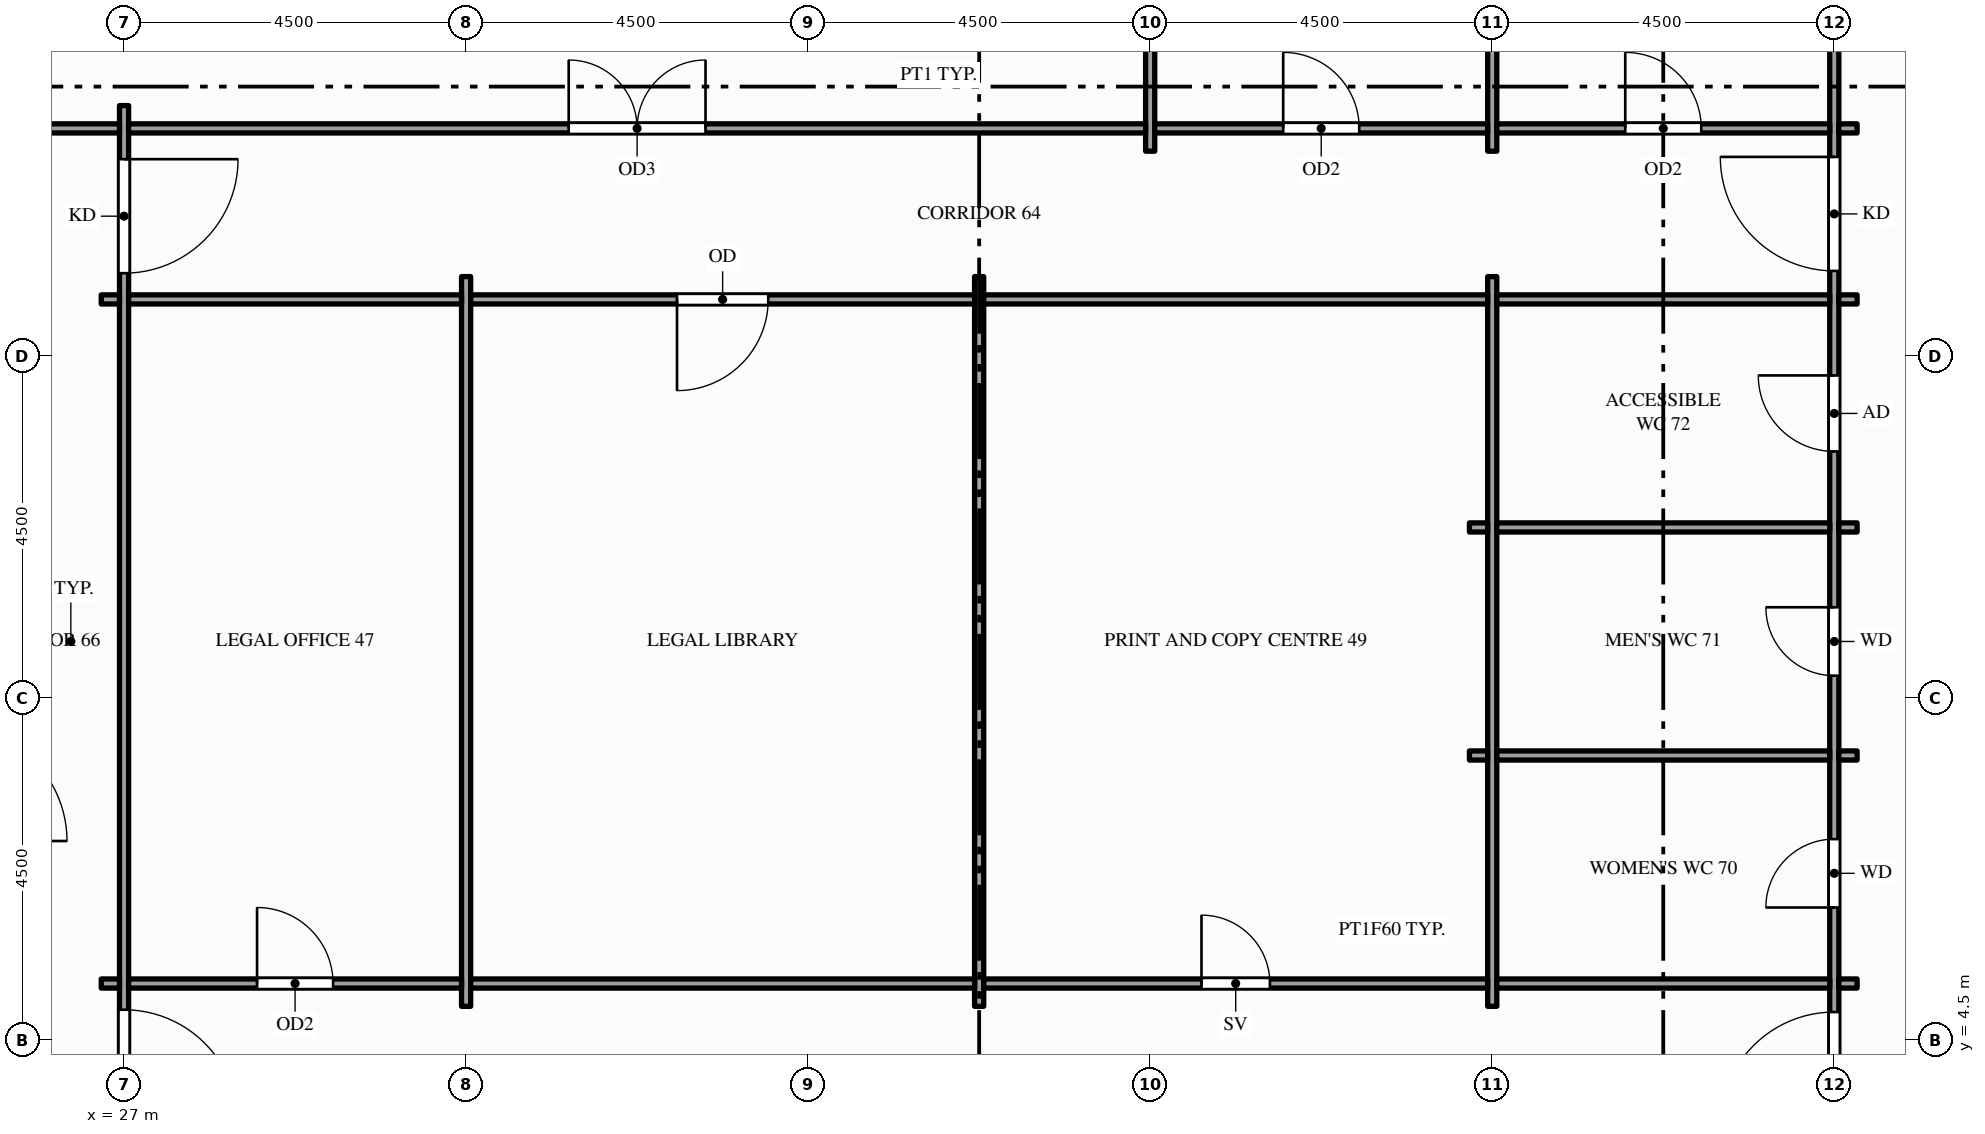
"""IFC4 building model, lengths in metres.
Left out: names, types, materials, properties, quantities, classifications, styles, units other than length and angle.
Written with IfcOpenShell. Run it as: python <this file> out.ifc"""

import sys

from ifc_helpers import new_model, si_unit, direction, frame, frame_2d, origin, place, context, subcontext, project, spatial, rectangle, extrude, element, fill, save


model = new_model("IFC4")
c1 = context("Model", 3, precision=1e-05, world=origin(), true_north=direction((0.0, 1.0)))
c2 = subcontext(c1, "Body", "Model", "MODEL_VIEW")
j1 = project(units=[si_unit("LENGTHUNIT", "METRE"), si_unit("PLANEANGLEUNIT", "RADIAN")], contexts=[c1])
p1 = place(None, origin())
s1 = spatial("IfcSite", under=j1, at=p1, CompositionType="ELEMENT")
p2 = place(p1, origin())
s2 = spatial("IfcBuilding", under=s1, at=p2, CompositionType="ELEMENT")
p3 = place(p2, frame((0.0, 0.0, 223.0)))
s3 = spatial("IfcBuildingStorey", under=s2, at=p3, CompositionType="ELEMENT", Elevation=223.0)
p4 = place(p3, frame((27.0, 2.7, 0.0), z_axis=(0.0, 0.0, 1.0), x_axis=(0.0, 1.0, 0.0)))
e1 = element("IfcWall", 1, at=p4, inside=s3, PredefinedType="PARTITIONING", context=c2, shape_type="SweptSolid", body=[
    extrude(rectangle(XDim=14.1, YDim=0.12, at=frame_2d((7.05, 0.0))), origin(), (0.0, 0.0, 1.0), 2.87),
])
p5 = place(p4, frame((0.705, 0.0, 0.0)))
e2 = element("IfcOpeningElement", 2, at=p5, cuts=e1, PredefinedType="OPENING", context=c2, shape_type="SweptSolid", body=[
    extrude(rectangle(XDim=1.5, YDim=2.1, at=frame_2d((0.75, 1.05))), frame((0.0, 0.07, 0.0), z_axis=(0.0, -1.0, 0.0), x_axis=(1.0, 0.0, 0.0)), (0.0, 0.0, 1.0), 0.14),
])
p6 = place(p4, frame((11.895, 0.0, 0.0)))
e3 = element("IfcOpeningElement", 3, at=p6, cuts=e1, PredefinedType="OPENING", context=c2, shape_type="SweptSolid", body=[
    extrude(rectangle(XDim=1.5, YDim=2.1, at=frame_2d((0.75, 1.05))), frame((0.0, 0.07, 0.0), z_axis=(0.0, -1.0, 0.0), x_axis=(1.0, 0.0, 0.0)), (0.0, 0.0, 1.0), 0.14),
])
for number, where, z_axis, x_axis in (
    (4, (31.5, 4.95, 0.0), (0.0, 0.0, 1.0), (0.0, 1.0, 0.0)),
    (5, (38.25, 4.95, 0.0), (0.0, 0.0, 1.0), (0.0, 1.0, 0.0)),
):
    element("IfcWall", number, at=place(p3, frame(where, z_axis=z_axis, x_axis=x_axis)), inside=s3, PredefinedType="PARTITIONING", context=c2, shape_type="SweptSolid", body=[
        extrude(rectangle(XDim=9.6, YDim=0.12, at=frame_2d((4.8, 0.0))), origin(), (0.0, 0.0, 1.0), 2.87),
    ])
p7 = place(p3, frame((40.5, 16.2, 0.0), z_axis=(0.0, 0.0, 1.0), x_axis=(0.0, 1.0, 0.0)))
e6 = element("IfcWall", 6, at=p7, inside=s3, PredefinedType="PARTITIONING", context=c2, shape_type="SweptSolid", body=[
    extrude(rectangle(XDim=4.65, YDim=0.12, at=frame_2d((2.325, 0.0))), origin(), (0.0, 0.0, 1.0), 2.87),
])
p8 = place(p3, frame((45.0, 4.95, 0.0), z_axis=(0.0, 0.0, 1.0), x_axis=(0.0, 1.0, 0.0)))
e7 = element("IfcWall", 7, at=p8, inside=s3, PredefinedType="PARTITIONING", context=c2, shape_type="SweptSolid", body=[
    extrude(rectangle(XDim=9.6, YDim=0.12, at=frame_2d((4.8, 0.0))), origin(), (0.0, 0.0, 1.0), 2.87),
])
p9 = place(p3, frame((45.0, 16.2, 0.0), z_axis=(0.0, 0.0, 1.0), x_axis=(0.0, 1.0, 0.0)))
e8 = element("IfcWall", 8, at=p9, inside=s3, PredefinedType="PARTITIONING", context=c2, shape_type="SweptSolid", body=[
    extrude(rectangle(XDim=4.65, YDim=0.12, at=frame_2d((2.325, 0.0))), origin(), (0.0, 0.0, 1.0), 2.87),
])
p10 = place(p3, frame((49.5, -1.35, 0.0), z_axis=(0.0, 0.0, 1.0), x_axis=(0.0, 1.0, 0.0)))
e9 = element("IfcWall", 9, at=p10, inside=s3, PredefinedType="PARTITIONING", context=c2, shape_type="SweptSolid", body=[
    extrude(rectangle(XDim=22.2, YDim=0.12, at=frame_2d((11.1, 0.0))), origin(), (0.0, 0.0, 1.0), 2.87),
])
p11 = place(p10, frame((4.725, 0.0, 0.0)))
e10 = element("IfcOpeningElement", 10, at=p11, cuts=e9, PredefinedType="OPENING", context=c2, shape_type="SweptSolid", body=[
    extrude(rectangle(XDim=1.5, YDim=2.1, at=frame_2d((0.75, 1.05))), frame((0.0, 0.07, 0.0), z_axis=(0.0, -1.0, 0.0), x_axis=(1.0, 0.0, 0.0)), (0.0, 0.0, 1.0), 0.14),
])
p12 = place(p10, frame((15.975, 0.0, 0.0)))
e11 = element("IfcOpeningElement", 11, at=p12, cuts=e9, PredefinedType="OPENING", context=c2, shape_type="SweptSolid", body=[
    extrude(rectangle(XDim=1.5, YDim=2.1, at=frame_2d((0.75, 1.05))), frame((0.0, 0.07, 0.0), z_axis=(0.0, -1.0, 0.0), x_axis=(1.0, 0.0, 0.0)), (0.0, 0.0, 1.0), 0.14),
])
p13 = place(p10, frame((7.6, 0.0, 0.0)))
e12 = element("IfcOpeningElement", 12, at=p13, cuts=e9, PredefinedType="OPENING", context=c2, shape_type="SweptSolid", body=[
    extrude(rectangle(XDim=0.9, YDim=2.1, at=frame_2d((0.45, 1.05))), frame((0.0, 0.07, 0.0), z_axis=(0.0, -1.0, 0.0), x_axis=(1.0, 0.0, 0.0)), (0.0, 0.0, 1.0), 0.14),
])
p14 = place(p10, frame((10.65, 0.0, 0.0)))
e13 = element("IfcOpeningElement", 13, at=p14, cuts=e9, PredefinedType="OPENING", context=c2, shape_type="SweptSolid", body=[
    extrude(rectangle(XDim=0.9, YDim=2.1, at=frame_2d((0.45, 1.05))), frame((0.0, 0.07, 0.0), z_axis=(0.0, -1.0, 0.0), x_axis=(1.0, 0.0, 0.0)), (0.0, 0.0, 1.0), 0.14),
])
p15 = place(p10, frame((13.6, 0.0, 0.0)))
e14 = element("IfcOpeningElement", 14, at=p15, cuts=e9, PredefinedType="OPENING", context=c2, shape_type="SweptSolid", body=[
    extrude(rectangle(XDim=1.0, YDim=2.1, at=frame_2d((0.5, 1.05))), frame((0.0, 0.07, 0.0), z_axis=(0.0, -1.0, 0.0), x_axis=(1.0, 0.0, 0.0)), (0.0, 0.0, 1.0), 0.14),
])
p16 = place(p3, frame((26.7, 5.25, 0.0), z_axis=(0.0, 0.0, 1.0), x_axis=(1.0, 0.0, 0.0)))
e15 = element("IfcWall", 15, at=p16, inside=s3, PredefinedType="PARTITIONING", context=c2, shape_type="SweptSolid", body=[
    extrude(rectangle(XDim=0.24, YDim=0.12, at=frame_2d((0.12, 0.0))), origin(), (0.0, 0.0, 1.0), 2.87),
])
p17 = place(p3, frame((27.06, 5.25, 0.0), z_axis=(0.0, 0.0, 1.0), x_axis=(1.0, 0.0, 0.0)))
e16 = element("IfcWall", 16, at=p17, inside=s3, PredefinedType="PARTITIONING", context=c2, shape_type="SweptSolid", body=[
    extrude(rectangle(XDim=4.38, YDim=0.12, at=frame_2d((2.19, 0.0))), origin(), (0.0, 0.0, 1.0), 2.87),
])
p18 = place(p17, frame((1.69, 0.0, 0.0)))
e17 = element("IfcOpeningElement", 17, at=p18, cuts=e16, PredefinedType="OPENING", context=c2, shape_type="SweptSolid", body=[
    extrude(rectangle(XDim=1.0, YDim=2.1, at=frame_2d((0.5, 1.05))), frame((0.0, 0.07, 0.0), z_axis=(0.0, -1.0, 0.0), x_axis=(1.0, 0.0, 0.0)), (0.0, 0.0, 1.0), 0.14),
])
p19 = place(p3, frame((31.56, 5.25, 0.0), z_axis=(0.0, 0.0, 1.0), x_axis=(1.0, 0.0, 0.0)))
e18 = element("IfcWall", 18, at=p19, inside=s3, PredefinedType="PARTITIONING", context=c2, shape_type="SweptSolid", body=[
    extrude(rectangle(XDim=6.63, YDim=0.12, at=frame_2d((3.315, 0.0))), origin(), (0.0, 0.0, 1.0), 2.87),
])
p20 = place(p3, frame((38.31, 5.25, 0.0), z_axis=(0.0, 0.0, 1.0), x_axis=(1.0, 0.0, 0.0)))
e19 = element("IfcWall", 19, at=p20, inside=s3, PredefinedType="PARTITIONING", context=c2, shape_type="SweptSolid", body=[
    extrude(rectangle(XDim=6.63, YDim=0.12, at=frame_2d((3.315, 0.0))), origin(), (0.0, 0.0, 1.0), 2.87),
])
p21 = place(p20, frame((2.865, 0.0, 0.0)))
e20 = element("IfcOpeningElement", 20, at=p21, cuts=e19, PredefinedType="OPENING", context=c2, shape_type="SweptSolid", body=[
    extrude(rectangle(XDim=0.9, YDim=2.1, at=frame_2d((0.45, 1.05))), frame((0.0, 0.07, 0.0), z_axis=(0.0, -1.0, 0.0), x_axis=(1.0, 0.0, 0.0)), (0.0, 0.0, 1.0), 0.14),
])
p22 = place(p3, frame((45.06, 5.25, 0.0), z_axis=(0.0, 0.0, 1.0), x_axis=(1.0, 0.0, 0.0)))
e21 = element("IfcWall", 21, at=p22, inside=s3, PredefinedType="PARTITIONING", context=c2, shape_type="SweptSolid", body=[
    extrude(rectangle(XDim=4.38, YDim=0.12, at=frame_2d((2.19, 0.0))), origin(), (0.0, 0.0, 1.0), 2.87),
])
for number, where, z_axis, x_axis in (
    (22, (49.56, 5.25, 0.0), (0.0, 0.0, 1.0), (1.0, 0.0, 0.0)),
    (23, (44.7, 8.25, 0.0), (0.0, 0.0, 1.0), (1.0, 0.0, 0.0)),
):
    element("IfcWall", number, at=place(p3, frame(where, z_axis=z_axis, x_axis=x_axis)), inside=s3, PredefinedType="PARTITIONING", context=c2, shape_type="SweptSolid", body=[
        extrude(rectangle(XDim=0.24, YDim=0.12, at=frame_2d((0.12, 0.0))), origin(), (0.0, 0.0, 1.0), 2.87),
    ])
p23 = place(p3, frame((45.06, 8.25, 0.0), z_axis=(0.0, 0.0, 1.0), x_axis=(1.0, 0.0, 0.0)))
e24 = element("IfcWall", 24, at=p23, inside=s3, PredefinedType="PARTITIONING", context=c2, shape_type="SweptSolid", body=[
    extrude(rectangle(XDim=4.38, YDim=0.12, at=frame_2d((2.19, 0.0))), origin(), (0.0, 0.0, 1.0), 2.87),
])
for number, where, z_axis, x_axis in (
    (25, (49.56, 8.25, 0.0), (0.0, 0.0, 1.0), (1.0, 0.0, 0.0)),
    (26, (44.7, 11.25, 0.0), (0.0, 0.0, 1.0), (1.0, 0.0, 0.0)),
):
    element("IfcWall", number, at=place(p3, frame(where, z_axis=z_axis, x_axis=x_axis)), inside=s3, PredefinedType="PARTITIONING", context=c2, shape_type="SweptSolid", body=[
        extrude(rectangle(XDim=0.24, YDim=0.12, at=frame_2d((0.12, 0.0))), origin(), (0.0, 0.0, 1.0), 2.87),
    ])
p24 = place(p3, frame((45.06, 11.25, 0.0), z_axis=(0.0, 0.0, 1.0), x_axis=(1.0, 0.0, 0.0)))
e27 = element("IfcWall", 27, at=p24, inside=s3, PredefinedType="PARTITIONING", context=c2, shape_type="SweptSolid", body=[
    extrude(rectangle(XDim=4.38, YDim=0.12, at=frame_2d((2.19, 0.0))), origin(), (0.0, 0.0, 1.0), 2.87),
])
for number, where, z_axis, x_axis in (
    (28, (49.56, 11.25, 0.0), (0.0, 0.0, 1.0), (1.0, 0.0, 0.0)),
    (29, (26.7, 14.25, 0.0), (0.0, 0.0, 1.0), (1.0, 0.0, 0.0)),
):
    element("IfcWall", number, at=place(p3, frame(where, z_axis=z_axis, x_axis=x_axis)), inside=s3, PredefinedType="PARTITIONING", context=c2, shape_type="SweptSolid", body=[
        extrude(rectangle(XDim=0.24, YDim=0.12, at=frame_2d((0.12, 0.0))), origin(), (0.0, 0.0, 1.0), 2.87),
    ])
p25 = place(p3, frame((27.06, 14.25, 0.0), z_axis=(0.0, 0.0, 1.0), x_axis=(1.0, 0.0, 0.0)))
e30 = element("IfcWall", 30, at=p25, inside=s3, PredefinedType="PARTITIONING", context=c2, shape_type="SweptSolid", body=[
    extrude(rectangle(XDim=4.38, YDim=0.12, at=frame_2d((2.19, 0.0))), origin(), (0.0, 0.0, 1.0), 2.87),
])
p26 = place(p3, frame((31.56, 14.25, 0.0), z_axis=(0.0, 0.0, 1.0), x_axis=(1.0, 0.0, 0.0)))
e31 = element("IfcWall", 31, at=p26, inside=s3, PredefinedType="PARTITIONING", context=c2, shape_type="SweptSolid", body=[
    extrude(rectangle(XDim=6.63, YDim=0.12, at=frame_2d((3.315, 0.0))), origin(), (0.0, 0.0, 1.0), 2.87),
])
p27 = place(p26, frame((2.715, 0.0, 0.0)))
e32 = element("IfcOpeningElement", 32, at=p27, cuts=e31, PredefinedType="OPENING", context=c2, shape_type="SweptSolid", body=[
    extrude(rectangle(XDim=1.2, YDim=2.1, at=frame_2d((0.6, 1.05))), frame((0.0, 0.07, 0.0), z_axis=(0.0, -1.0, 0.0), x_axis=(1.0, 0.0, 0.0)), (0.0, 0.0, 1.0), 0.14),
])
p28 = place(p3, frame((38.31, 14.25, 0.0), z_axis=(0.0, 0.0, 1.0), x_axis=(1.0, 0.0, 0.0)))
e33 = element("IfcWall", 33, at=p28, inside=s3, PredefinedType="PARTITIONING", context=c2, shape_type="SweptSolid", body=[
    extrude(rectangle(XDim=6.63, YDim=0.12, at=frame_2d((3.315, 0.0))), origin(), (0.0, 0.0, 1.0), 2.87),
])
p29 = place(p3, frame((45.06, 14.25, 0.0), z_axis=(0.0, 0.0, 1.0), x_axis=(1.0, 0.0, 0.0)))
e34 = element("IfcWall", 34, at=p29, inside=s3, PredefinedType="PARTITIONING", context=c2, shape_type="SweptSolid", body=[
    extrude(rectangle(XDim=4.38, YDim=0.12, at=frame_2d((2.19, 0.0))), origin(), (0.0, 0.0, 1.0), 2.87),
])
p30 = place(p3, frame((49.56, 14.25, 0.0), z_axis=(0.0, 0.0, 1.0), x_axis=(1.0, 0.0, 0.0)))
e35 = element("IfcWall", 35, at=p30, inside=s3, PredefinedType="PARTITIONING", context=c2, shape_type="SweptSolid", body=[
    extrude(rectangle(XDim=0.24, YDim=0.12, at=frame_2d((0.12, 0.0))), origin(), (0.0, 0.0, 1.0), 2.87),
])
p31 = place(p3, frame((24.81, 16.5, 0.0), z_axis=(0.0, 0.0, 1.0), x_axis=(1.0, 0.0, 0.0)))
e36 = element("IfcWall", 36, at=p31, inside=s3, PredefinedType="PARTITIONING", context=c2, shape_type="SweptSolid", body=[
    extrude(rectangle(XDim=2.13, YDim=0.12, at=frame_2d((1.065, 0.0))), origin(), (0.0, 0.0, 1.0), 2.76),
])
p32 = place(p3, frame((27.06, 16.5, 0.0), z_axis=(0.0, 0.0, 1.0), x_axis=(1.0, 0.0, 0.0)))
e37 = element("IfcWall", 37, at=p32, inside=s3, PredefinedType="PARTITIONING", context=c2, shape_type="SweptSolid", body=[
    extrude(rectangle(XDim=13.38, YDim=0.12, at=frame_2d((6.69, 0.0))), origin(), (0.0, 0.0, 1.0), 2.87),
])
p33 = place(p32, frame((5.79, 0.0, 0.0)))
e38 = element("IfcOpeningElement", 38, at=p33, cuts=e37, PredefinedType="OPENING", context=c2, shape_type="SweptSolid", body=[
    extrude(rectangle(XDim=1.8, YDim=2.1, at=frame_2d((0.9, 1.05))), frame((0.0, 0.07, 0.0), z_axis=(0.0, -1.0, 0.0), x_axis=(1.0, 0.0, 0.0)), (0.0, 0.0, 1.0), 0.14),
])
p34 = place(p3, frame((40.56, 16.5, 0.0), z_axis=(0.0, 0.0, 1.0), x_axis=(1.0, 0.0, 0.0)))
e39 = element("IfcWall", 39, at=p34, inside=s3, PredefinedType="PARTITIONING", context=c2, shape_type="SweptSolid", body=[
    extrude(rectangle(XDim=4.38, YDim=0.12, at=frame_2d((2.19, 0.0))), origin(), (0.0, 0.0, 1.0), 2.87),
])
p35 = place(p34, frame((1.69, 0.0, 0.0)))
e40 = element("IfcOpeningElement", 40, at=p35, cuts=e39, PredefinedType="OPENING", context=c2, shape_type="SweptSolid", body=[
    extrude(rectangle(XDim=1.0, YDim=2.1, at=frame_2d((0.5, 1.05))), frame((0.0, 0.07, 0.0), z_axis=(0.0, -1.0, 0.0), x_axis=(1.0, 0.0, 0.0)), (0.0, 0.0, 1.0), 0.14),
])
p36 = place(p3, frame((45.06, 16.5, 0.0), z_axis=(0.0, 0.0, 1.0), x_axis=(1.0, 0.0, 0.0)))
e41 = element("IfcWall", 41, at=p36, inside=s3, PredefinedType="PARTITIONING", context=c2, shape_type="SweptSolid", body=[
    extrude(rectangle(XDim=4.38, YDim=0.12, at=frame_2d((2.19, 0.0))), origin(), (0.0, 0.0, 1.0), 2.87),
])
p37 = place(p36, frame((1.69, 0.0, 0.0)))
e42 = element("IfcOpeningElement", 42, at=p37, cuts=e41, PredefinedType="OPENING", context=c2, shape_type="SweptSolid", body=[
    extrude(rectangle(XDim=1.0, YDim=2.1, at=frame_2d((0.5, 1.05))), frame((0.0, 0.07, 0.0), z_axis=(0.0, -1.0, 0.0), x_axis=(1.0, 0.0, 0.0)), (0.0, 0.0, 1.0), 0.14),
])
p38 = place(p3, frame((49.56, 16.5, 0.0), z_axis=(0.0, 0.0, 1.0), x_axis=(1.0, 0.0, 0.0)))
e43 = element("IfcWall", 43, at=p38, inside=s3, PredefinedType="PARTITIONING", context=c2, shape_type="SweptSolid", body=[
    extrude(rectangle(XDim=0.24, YDim=0.12, at=frame_2d((0.12, 0.0))), origin(), (0.0, 0.0, 1.0), 2.87),
])
p39 = place(p5, origin())
e44 = element("IfcDoor", 44, at=p39, inside=s3, OperationType="SINGLE_SWING_LEFT", PredefinedType="DOOR", context=c2, shape_type="SweptSolid", body=[
    extrude(rectangle(XDim=1.5, YDim=2.1, at=frame_2d((0.75, 1.05))), frame((0.0, 0.025, 0.0), z_axis=(0.0, -1.0, 0.0), x_axis=(1.0, 0.0, 0.0)), (0.0, 0.0, 1.0), 0.05),
])
fill(e2, e44)
p40 = place(p6, origin())
e45 = element("IfcDoor", 45, at=p40, inside=s3, OperationType="SINGLE_SWING_RIGHT", PredefinedType="DOOR", context=c2, shape_type="SweptSolid", body=[
    extrude(rectangle(XDim=1.5, YDim=2.1, at=frame_2d((0.75, 1.05))), frame((0.0, 0.025, 0.0), z_axis=(0.0, -1.0, 0.0), x_axis=(1.0, 0.0, 0.0)), (0.0, 0.0, 1.0), 0.05),
])
fill(e3, e45)
p41 = place(p11, origin())
e46 = element("IfcDoor", 46, at=p41, inside=s3, OperationType="SINGLE_SWING_LEFT", PredefinedType="DOOR", context=c2, shape_type="SweptSolid", body=[
    extrude(rectangle(XDim=1.5, YDim=2.1, at=frame_2d((0.75, 1.05))), frame((0.0, 0.025, 0.0), z_axis=(0.0, -1.0, 0.0), x_axis=(1.0, 0.0, 0.0)), (0.0, 0.0, 1.0), 0.05),
])
fill(e10, e46)
p42 = place(p12, origin())
e47 = element("IfcDoor", 47, at=p42, inside=s3, OperationType="SINGLE_SWING_RIGHT", PredefinedType="DOOR", context=c2, shape_type="SweptSolid", body=[
    extrude(rectangle(XDim=1.5, YDim=2.1, at=frame_2d((0.75, 1.05))), frame((0.0, 0.025, 0.0), z_axis=(0.0, -1.0, 0.0), x_axis=(1.0, 0.0, 0.0)), (0.0, 0.0, 1.0), 0.05),
])
fill(e11, e47)
p43 = place(p18, origin())
e48 = element("IfcDoor", 48, at=p43, inside=s3, OperationType="SINGLE_SWING_LEFT", PredefinedType="DOOR", context=c2, shape_type="SweptSolid", body=[
    extrude(rectangle(XDim=1.0, YDim=2.1, at=frame_2d((0.5, 1.05))), frame((0.0, 0.025, 0.0), z_axis=(0.0, -1.0, 0.0), x_axis=(1.0, 0.0, 0.0)), (0.0, 0.0, 1.0), 0.05),
])
fill(e17, e48)
p44 = place(p27, origin())
e49 = element("IfcDoor", 49, at=p44, inside=s3, OperationType="SINGLE_SWING_LEFT", PredefinedType="DOOR", context=c2, shape_type="SweptSolid", body=[
    extrude(rectangle(XDim=1.2, YDim=2.1, at=frame_2d((0.6, 1.05))), frame((0.0, 0.025, 0.0), z_axis=(0.0, -1.0, 0.0), x_axis=(1.0, 0.0, 0.0)), (0.0, 0.0, 1.0), 0.05),
])
fill(e32, e49)
p45 = place(p21, origin())
e50 = element("IfcDoor", 50, at=p45, inside=s3, OperationType="SINGLE_SWING_LEFT", PredefinedType="DOOR", context=c2, shape_type="SweptSolid", body=[
    extrude(rectangle(XDim=0.9, YDim=2.1, at=frame_2d((0.45, 1.05))), frame((0.0, 0.025, 0.0), z_axis=(0.0, -1.0, 0.0), x_axis=(1.0, 0.0, 0.0)), (0.0, 0.0, 1.0), 0.05),
])
fill(e20, e50)
p46 = place(p13, origin())
e51 = element("IfcDoor", 51, at=p46, inside=s3, OperationType="SINGLE_SWING_LEFT", PredefinedType="DOOR", context=c2, shape_type="SweptSolid", body=[
    extrude(rectangle(XDim=0.9, YDim=2.1, at=frame_2d((0.45, 1.05))), frame((0.0, 0.025, 0.0), z_axis=(0.0, -1.0, 0.0), x_axis=(1.0, 0.0, 0.0)), (0.0, 0.0, 1.0), 0.05),
])
fill(e12, e51)
p47 = place(p14, origin())
e52 = element("IfcDoor", 52, at=p47, inside=s3, OperationType="SINGLE_SWING_RIGHT", PredefinedType="DOOR", context=c2, shape_type="SweptSolid", body=[
    extrude(rectangle(XDim=0.9, YDim=2.1, at=frame_2d((0.45, 1.05))), frame((0.0, 0.025, 0.0), z_axis=(0.0, -1.0, 0.0), x_axis=(1.0, 0.0, 0.0)), (0.0, 0.0, 1.0), 0.05),
])
fill(e13, e52)
p48 = place(p15, origin())
e53 = element("IfcDoor", 53, at=p48, inside=s3, OperationType="SINGLE_SWING_RIGHT", PredefinedType="DOOR", context=c2, shape_type="SweptSolid", body=[
    extrude(rectangle(XDim=1.0, YDim=2.1, at=frame_2d((0.5, 1.05))), frame((0.0, 0.025, 0.0), z_axis=(0.0, -1.0, 0.0), x_axis=(1.0, 0.0, 0.0)), (0.0, 0.0, 1.0), 0.05),
])
fill(e14, e53)
p49 = place(p33, origin())
e54 = element("IfcDoor", 54, at=p49, inside=s3, OperationType="DOUBLE_DOOR_SINGLE_SWING", PredefinedType="DOOR", context=c2, shape_type="SweptSolid", body=[
    extrude(rectangle(XDim=1.8, YDim=2.1, at=frame_2d((0.9, 1.05))), frame((0.0, 0.025, 0.0), z_axis=(0.0, -1.0, 0.0), x_axis=(1.0, 0.0, 0.0)), (0.0, 0.0, 1.0), 0.05),
])
fill(e38, e54)
p50 = place(p35, origin())
e55 = element("IfcDoor", 55, at=p50, inside=s3, OperationType="SINGLE_SWING_LEFT", PredefinedType="DOOR", context=c2, shape_type="SweptSolid", body=[
    extrude(rectangle(XDim=1.0, YDim=2.1, at=frame_2d((0.5, 1.05))), frame((0.0, 0.025, 0.0), z_axis=(0.0, -1.0, 0.0), x_axis=(1.0, 0.0, 0.0)), (0.0, 0.0, 1.0), 0.05),
])
fill(e40, e55)
p51 = place(p37, origin())
e56 = element("IfcDoor", 56, at=p51, inside=s3, OperationType="SINGLE_SWING_LEFT", PredefinedType="DOOR", context=c2, shape_type="SweptSolid", body=[
    extrude(rectangle(XDim=1.0, YDim=2.1, at=frame_2d((0.5, 1.05))), frame((0.0, 0.025, 0.0), z_axis=(0.0, -1.0, 0.0), x_axis=(1.0, 0.0, 0.0)), (0.0, 0.0, 1.0), 0.05),
])
fill(e42, e56)
save(model, sys.argv[1])
